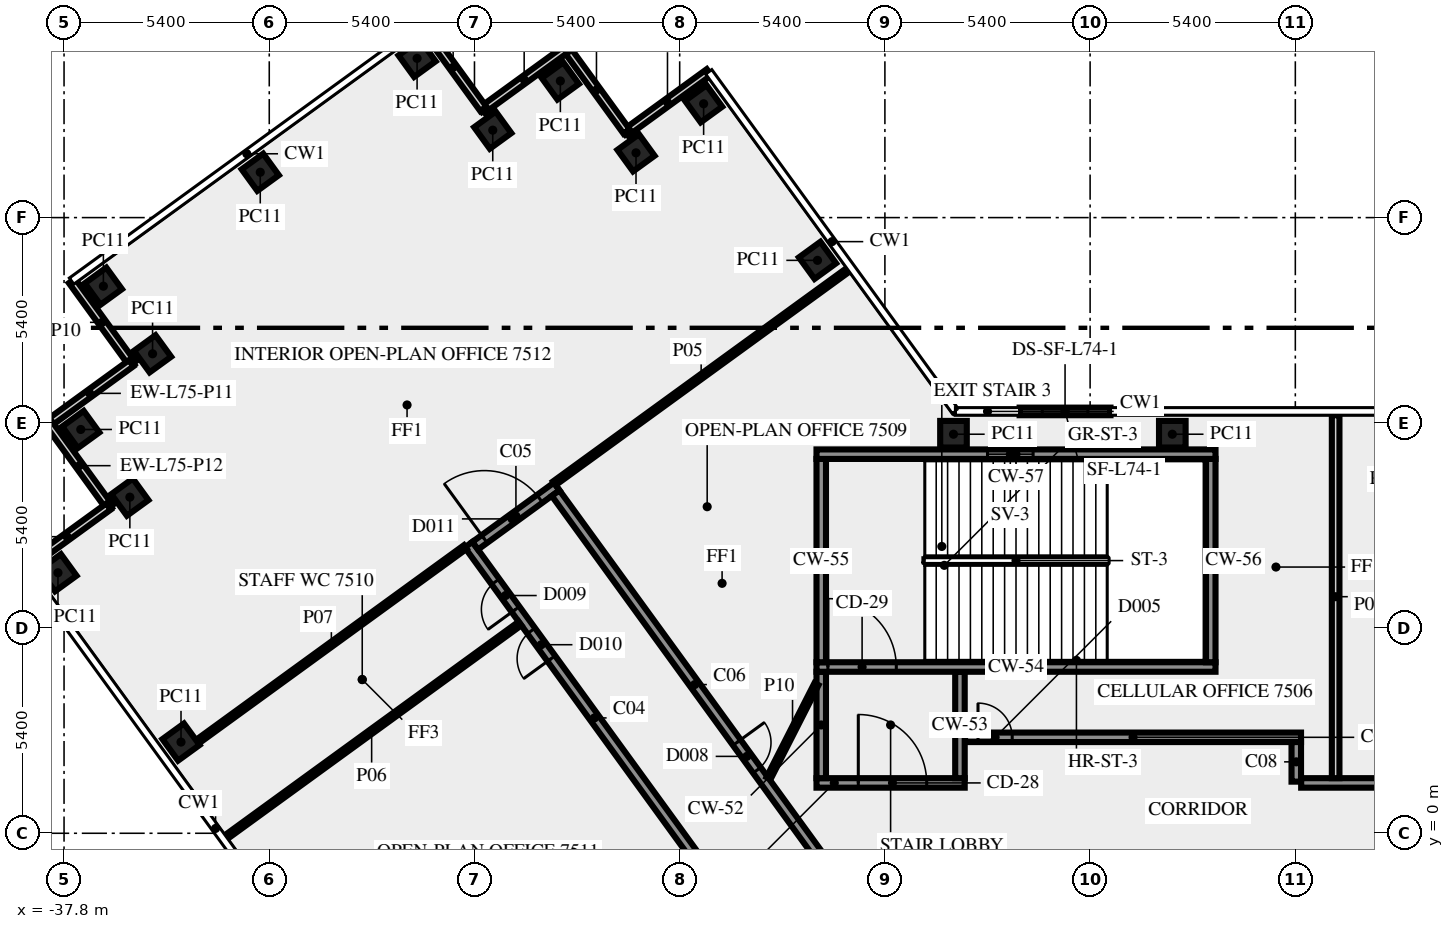
"""IFC4 building model, lengths in metres.
Left out: names, types, materials, properties, quantities, classifications, styles, units other than length and angle.
Written with IfcOpenShell. Run it as: python <this file> out.ifc"""

import sys

from ifc_helpers import new_model, si_unit, direction, frame, frame_2d, origin, origin_2d, place, context, subcontext, project, spatial, rectangle, extrude, element, fill, save


model = new_model("IFC4")
c1 = context("Model", 3, precision=1e-05, world=origin(), true_north=direction((0.0, 1.0)))
c2 = subcontext(c1, "Body", "Model", "MODEL_VIEW")
j1 = project(units=[si_unit("LENGTHUNIT", "METRE"), si_unit("PLANEANGLEUNIT", "RADIAN")], contexts=[c1])
p1 = place(None, origin())
s1 = spatial("IfcSite", under=j1, at=p1, CompositionType="ELEMENT")
p2 = place(p1, origin())
s2 = spatial("IfcBuilding", under=s1, at=p2, CompositionType="ELEMENT")
p3 = place(p2, frame((0.0, 0.0, 323.0)))
s3 = spatial("IfcBuildingStorey", under=s2, at=p3, CompositionType="ELEMENT", Elevation=323.0)
for number, where, z_axis, x_axis in (
    (1, (-17.974, 15.075, 0.0), (0.0, 0.0, 1.0), (-0.588, 0.809, 0.0)),
    (2, (-20.97, 19.195, 0.0), (0.0, 0.0, 1.0), (-0.588, 0.809, 0.0)),
    (3, (-22.749, 17.904, 0.0), (0.0, 0.0, 1.0), (-0.588, 0.809, 0.0)),
    (4, (-24.74, 19.795, 0.0), (0.0, 0.0, 1.0), (-0.588, 0.809, 0.0)),
    (5, (-26.519, 18.5, 0.0), (0.0, 0.0, 1.0), (-0.588, 0.809, 0.0)),
    (6, (-28.51, 20.39, 0.0), (0.0, 0.0, 1.0), (-0.809, -0.588, 0.0)),
    (7, (-32.637, 17.393, 0.0), (0.0, 0.0, 1.0), (-0.809, -0.588, 0.0)),
    (8, (-36.765, 14.395, 0.0), (0.0, 0.0, 1.0), (0.588, -0.809, 0.0)),
    (9, (-35.471, 12.616, 0.0), (0.0, 0.0, 1.0), (-0.809, -0.588, 0.0)),
    (10, (-37.36, 10.625, 0.0), (0.0, 0.0, 1.0), (0.588, -0.809, 0.0)),
    (11, (-36.068, 8.844, 0.0), (0.0, 0.0, 1.0), (0.588, -0.809, 0.0)),
    (12, (-37.96, 6.855, 0.0), (0.0, 0.0, 1.0), (0.588, -0.809, 0.0)),
    (13, (-34.722, 2.4, 0.0), (0.0, 0.0, 1.0), (0.588, -0.809, 0.0)),
    (14, (-8.637, 10.5, 0.0), (0.0, 0.0, 1.0), (-1.0, 0.0, 0.0)),
    (15, (-14.395, 10.5, 0.0), (0.0, 0.0, 1.0), (-1.0, 0.0, 0.0)),
):
    element("IfcColumn", number, at=place(p3, frame(where, z_axis=z_axis, x_axis=x_axis)), inside=s3, PredefinedType="COLUMN", context=c2, shape_type="SweptSolid", body=[
        extrude(rectangle(XDim=0.7, YDim=0.7, at=origin_2d()), origin(), (0.0, 0.0, 1.0), 3.65),
    ])
for number, where, z_axis, x_axis in (
    (16, (-20.829, 20.025, 0.0), (0.0, 0.0, 1.0), (-0.809, -0.588, 0.0)),
    (17, (-22.996, 18.466, 0.0), (0.0, 0.0, 1.0), (-0.588, 0.809, 0.0)),
):
    element("IfcWall", number, at=place(p3, frame(where, z_axis=z_axis, x_axis=x_axis)), inside=s3, PredefinedType="SOLIDWALL", context=c2, shape_type="SweptSolid", body=[
        extrude(rectangle(XDim=2.7, YDim=0.2, at=frame_2d((1.35, 0.0))), origin(), (0.0, 0.0, 1.0), 3.65),
    ])
for number, where, z_axis, x_axis in (
    (18, (-24.6, 20.623, 0.0), (0.0, 0.0, 1.0), (-0.809, -0.588, 0.0)),
    (19, (-26.768, 19.063, 0.0), (0.0, 0.0, 1.0), (-0.588, 0.809, 0.0)),
):
    element("IfcWall", number, at=place(p3, frame(where, z_axis=z_axis, x_axis=x_axis)), inside=s3, PredefinedType="SOLIDWALL", context=c2, shape_type="SweptSolid", body=[
        extrude(rectangle(XDim=2.7, YDim=0.2, at=frame_2d((1.35, 0.0))), origin(), (0.0, 0.0, 1.0), 3.65),
    ])
for number, where, z_axis, x_axis in (
    (20, (-37.592, 14.536, 0.0), (0.0, 0.0, 1.0), (0.588, -0.809, 0.0)),
    (21, (-36.032, 12.369, 0.0), (0.0, 0.0, 1.0), (-0.809, -0.588, 0.0)),
    (22, (-38.189, 10.765, 0.0), (0.0, 0.0, 1.0), (0.588, -0.809, 0.0)),
    (23, (-36.629, 8.597, 0.0), (0.0, 0.0, 1.0), (-0.809, -0.588, 0.0)),
):
    element("IfcWall", number, at=place(p3, frame(where, z_axis=z_axis, x_axis=x_axis)), inside=s3, PredefinedType="SOLIDWALL", context=c2, shape_type="SweptSolid", body=[
        extrude(rectangle(XDim=2.7, YDim=0.2, at=frame_2d((1.35, 0.0))), origin(), (0.0, 0.0, 1.0), 3.65),
    ])
p4 = place(p3, frame((-10.263, 11.1, 0.0), z_axis=(0.0, 0.0, 1.0), x_axis=(-1.0, 0.0, 0.0)))
e24 = element("IfcWall", 24, at=p4, inside=s3, PredefinedType="SOLIDWALL", context=c2, shape_type="SweptSolid", body=[
    extrude(rectangle(XDim=2.392, YDim=0.2, at=frame_2d((1.196, 0.0))), origin(), (0.0, 0.0, 1.0), 3.65),
])
p5 = place(p4, frame((0.596, 0.0, 1.0)))
e25 = element("IfcOpeningElement", 25, at=p5, cuts=e24, PredefinedType="OPENING", context=c2, shape_type="SweptSolid", body=[
    extrude(rectangle(XDim=1.2, YDim=1.2, at=frame_2d((0.6, 0.6))), frame((0.0, 0.11, 0.0), z_axis=(0.0, -1.0, 0.0), x_axis=(1.0, 0.0, 0.0)), (0.0, 0.0, 1.0), 0.22),
])
p6 = place(p3, frame((-18.0, 1.325, 0.0), z_axis=(0.0, 0.0, 1.0), x_axis=(1.0, 0.0, 0.0)))
e26 = element("IfcWall", 26, at=p6, inside=s3, PredefinedType="SHEAR", context=c2, shape_type="SweptSolid", body=[
    extrude(rectangle(XDim=3.9, YDim=0.25, at=frame_2d((1.95, 0.0))), origin(), (0.0, 0.0, 1.0), 3.65),
])
p7 = place(p6, frame((1.1, 0.0, 0.0)))
e27 = element("IfcOpeningElement", 27, at=p7, cuts=e26, PredefinedType="OPENING", context=c2, shape_type="SweptSolid", body=[
    extrude(rectangle(XDim=1.8, YDim=2.1, at=frame_2d((0.9, 1.05))), frame((0.0, 0.135, 0.0), z_axis=(0.0, -1.0, 0.0), x_axis=(1.0, 0.0, 0.0)), (0.0, 0.0, 1.0), 0.27),
])
for number, where, z_axis, x_axis in (
    (28, (-17.875, 1.45, 0.0), (0.0, 0.0, 1.0), (0.0, 1.0, 0.0)),
    (29, (-14.225, 1.45, 0.0), (0.0, 0.0, 1.0), (0.0, 1.0, 0.0)),
):
    element("IfcWall", number, at=place(p3, frame(where, z_axis=z_axis, x_axis=x_axis)), inside=s3, PredefinedType="SHEAR", context=c2, shape_type="SweptSolid", body=[
        extrude(rectangle(XDim=2.8, YDim=0.25, at=frame_2d((1.4, 0.0))), origin(), (0.0, 0.0, 1.0), 3.65),
    ])
p8 = place(p3, frame((-18.0, 4.375, 0.0), z_axis=(0.0, 0.0, 1.0), x_axis=(1.0, 0.0, 0.0)))
e30 = element("IfcWall", 30, at=p8, inside=s3, PredefinedType="SHEAR", context=c2, shape_type="SweptSolid", body=[
    extrude(rectangle(XDim=10.5, YDim=0.25, at=frame_2d((5.25, 0.0))), origin(), (0.0, 0.0, 1.0), 3.65),
])
p9 = place(p8, frame((0.3, 0.0, 0.0)))
e31 = element("IfcOpeningElement", 31, at=p9, cuts=e30, PredefinedType="OPENING", context=c2, shape_type="SweptSolid", body=[
    extrude(rectangle(XDim=1.8, YDim=2.1, at=frame_2d((0.9, 1.05))), frame((0.0, 0.135, 0.0), z_axis=(0.0, -1.0, 0.0), x_axis=(1.0, 0.0, 0.0)), (0.0, 0.0, 1.0), 0.27),
])
for number, where, z_axis, x_axis in (
    (32, (-17.875, 4.5, 0.0), (0.0, 0.0, 1.0), (0.0, 1.0, 0.0)),
    (33, (-7.625, 4.5, 0.0), (0.0, 0.0, 1.0), (0.0, 1.0, 0.0)),
):
    element("IfcWall", number, at=place(p3, frame(where, z_axis=z_axis, x_axis=x_axis)), inside=s3, PredefinedType="SHEAR", context=c2, shape_type="SweptSolid", body=[
        extrude(rectangle(XDim=5.35, YDim=0.25, at=frame_2d((2.675, 0.0))), origin(), (0.0, 0.0, 1.0), 3.65),
    ])
p10 = place(p3, frame((-18.0, 9.975, 0.0), z_axis=(0.0, 0.0, 1.0), x_axis=(1.0, 0.0, 0.0)))
e34 = element("IfcWall", 34, at=p10, inside=s3, PredefinedType="SHEAR", context=c2, shape_type="SweptSolid", body=[
    extrude(rectangle(XDim=10.5, YDim=0.25, at=frame_2d((5.25, 0.0))), origin(), (0.0, 0.0, 1.0), 3.65),
])
p11 = place(p10, frame((4.5, 0.0, 1.0)))
e35 = element("IfcOpeningElement", 35, at=p11, cuts=e34, PredefinedType="OPENING", context=c2, shape_type="SweptSolid", body=[
    extrude(rectangle(XDim=1.2, YDim=1.2, at=frame_2d((0.6, 0.6))), frame((0.0, 0.135, 0.0), z_axis=(0.0, -1.0, 0.0), x_axis=(1.0, 0.0, 0.0)), (0.0, 0.0, 1.0), 0.27),
])
p12 = place(p3, frame((-20.531, -1.523, 0.0), z_axis=(0.0, 0.0, 1.0), x_axis=(-0.587782646447, 0.809018887626, 0.0)))
e36 = element("IfcWall", 36, at=p12, inside=s3, PredefinedType="SOLIDWALL", context=c2, shape_type="SweptSolid", body=[
    extrude(rectangle(XDim=11.27, YDim=0.25, at=frame_2d((5.635, 0.0))), origin(), (0.0, 0.0, 1.0), 3.65),
])
p13 = place(p12, frame((7.566, 0.0, 0.0)))
e37 = element("IfcOpeningElement", 37, at=p13, cuts=e36, PredefinedType="OPENING", context=c2, shape_type="SweptSolid", body=[
    extrude(rectangle(XDim=0.9, YDim=2.1, at=frame_2d((0.45, 1.05))), frame((0.0, 0.135, 0.0), z_axis=(0.0, -1.0, 0.0), x_axis=(1.0, 0.0, 0.0)), (0.0, 0.0, 1.0), 0.27),
])
p14 = place(p12, frame((9.165, 0.0, 0.0)))
e38 = element("IfcOpeningElement", 38, at=p14, cuts=e36, PredefinedType="OPENING", context=c2, shape_type="SweptSolid", body=[
    extrude(rectangle(XDim=0.9, YDim=2.1, at=frame_2d((0.45, 1.05))), frame((0.0, 0.135, 0.0), z_axis=(0.0, -1.0, 0.0), x_axis=(1.0, 0.0, 0.0)), (0.0, 0.0, 1.0), 0.27),
])
p15 = place(p3, frame((-26.981, 7.567, 0.0), z_axis=(0.0, 0.0, 1.0), x_axis=(0.809038743598, 0.587755315891, 0.0)))
e39 = element("IfcWall", 39, at=p15, inside=s3, PredefinedType="SOLIDWALL", context=c2, shape_type="SweptSolid", body=[
    extrude(rectangle(XDim=2.65, YDim=0.25, at=frame_2d((1.325, 0.0))), origin(), (0.0, 0.0, 1.0), 3.65),
])
p16 = place(p15, frame((0.3, 0.0, 0.0)))
e40 = element("IfcOpeningElement", 40, at=p16, cuts=e39, PredefinedType="OPENING", context=c2, shape_type="SweptSolid", body=[
    extrude(rectangle(XDim=1.8, YDim=2.1, at=frame_2d((0.9, 1.05))), frame((0.0, 0.135, 0.0), z_axis=(0.0, -1.0, 0.0), x_axis=(1.0, 0.0, 0.0)), (0.0, 0.0, 1.0), 0.27),
])
p17 = place(p3, frame((-24.865, 8.95, 0.0), z_axis=(0.0, 0.0, 1.0), x_axis=(0.587791617212, -0.809012369952, 0.0)))
e41 = element("IfcWall", 41, at=p17, inside=s3, PredefinedType="SOLIDWALL", context=c2, shape_type="SweptSolid", body=[
    extrude(rectangle(XDim=12.453, YDim=0.25, at=frame_2d((6.227, 0.0))), origin(), (0.0, 0.0, 1.0), 3.65),
])
p18 = place(p17, frame((8.112, 0.0, 0.0)))
e42 = element("IfcOpeningElement", 42, at=p18, cuts=e41, PredefinedType="OPENING", context=c2, shape_type="SweptSolid", body=[
    extrude(rectangle(XDim=0.9, YDim=2.1, at=frame_2d((0.45, 1.05))), frame((0.0, 0.135, 0.0), z_axis=(0.0, -1.0, 0.0), x_axis=(1.0, 0.0, 0.0)), (0.0, 0.0, 1.0), 0.27),
])
p19 = place(p3, frame((-14.09, 2.525, 0.0), z_axis=(0.0, 0.0, 1.0), x_axis=(1.0, 0.0, 0.0)))
e43 = element("IfcWall", 43, at=p19, inside=s3, PredefinedType="SOLIDWALL", context=c2, shape_type="SweptSolid", body=[
    extrude(rectangle(XDim=8.84, YDim=0.25, at=frame_2d((4.42, 0.0))), origin(), (0.0, 0.0, 1.0), 3.65),
])
p20 = place(p19, frame((0.34, 0.0, 0.0)))
e44 = element("IfcOpeningElement", 44, at=p20, cuts=e43, PredefinedType="OPENING", context=c2, shape_type="SweptSolid", body=[
    extrude(rectangle(XDim=0.9, YDim=2.1, at=frame_2d((0.45, 1.05))), frame((0.0, 0.135, 0.0), z_axis=(0.0, -1.0, 0.0), x_axis=(1.0, 0.0, 0.0)), (0.0, 0.0, 1.0), 0.27),
])
p21 = place(p3, frame((-5.375, 2.4, 0.0), z_axis=(0.0, 0.0, 1.0), x_axis=(0.0, -1.0, 0.0)))
e45 = element("IfcWall", 45, at=p21, inside=s3, PredefinedType="SOLIDWALL", context=c2, shape_type="SweptSolid", body=[
    extrude(rectangle(XDim=1.041, YDim=0.25, at=frame_2d((0.521, 0.0))), origin(), (0.0, 0.0, 1.0), 3.65),
])
p22 = place(p3, frame((-5.246, 1.325, 0.0), z_axis=(0.0, 0.0, 1.0), x_axis=(1.0, 0.0, 0.0)))
e46 = element("IfcWall", 46, at=p22, inside=s3, PredefinedType="SOLIDWALL", context=c2, shape_type="SweptSolid", body=[
    extrude(rectangle(XDim=19.336, YDim=0.25, at=frame_2d((9.668, 0.0))), origin(), (0.0, 0.0, 1.0), 3.65),
])
p23 = place(p22, frame((10.894, 0.0, 0.0)))
e47 = element("IfcOpeningElement", 47, at=p23, cuts=e46, PredefinedType="OPENING", context=c2, shape_type="SweptSolid", body=[
    extrude(rectangle(XDim=1.2, YDim=2.1, at=frame_2d((0.6, 1.05))), frame((0.0, 0.135, 0.0), z_axis=(0.0, -1.0, 0.0), x_axis=(1.0, 0.0, 0.0)), (0.0, 0.0, 1.0), 0.27),
])
p24 = place(p22, frame((18.096, 0.0, 0.0)))
e48 = element("IfcOpeningElement", 48, at=p24, cuts=e46, PredefinedType="OPENING", context=c2, shape_type="SweptSolid", body=[
    extrude(rectangle(XDim=0.9, YDim=2.1, at=frame_2d((0.45, 1.05))), frame((0.0, 0.135, 0.0), z_axis=(0.0, -1.0, 0.0), x_axis=(1.0, 0.0, 0.0)), (0.0, 0.0, 1.0), 0.27),
])
p25 = place(p3, frame((-4.339, 1.45, 0.0), z_axis=(0.0, 0.0, 1.0), x_axis=(0.0, 1.0, 0.0)))
e49 = element("IfcWall", 49, at=p25, inside=s3, PredefinedType="SOLIDWALL", context=c2, shape_type="SweptSolid", body=[
    extrude(rectangle(XDim=9.55, YDim=0.2, at=frame_2d((4.775, 0.0))), origin(), (0.0, 0.0, 1.0), 2.95),
])
p26 = place(p3, frame((-17.172, 14.823, 0.0), z_axis=(0.0, 0.0, 1.0), x_axis=(-0.809013490065, -0.587790075531, 0.0)))
e50 = element("IfcWall", 50, at=p26, inside=s3, PredefinedType="PARTITIONING", context=c2, shape_type="SweptSolid", body=[
    extrude(rectangle(XDim=9.549, YDim=0.12, at=frame_2d((4.775, 0.0))), origin(), (0.0, 0.0, 1.0), 2.95),
])
p27 = place(p3, frame((-25.802, 5.519, 0.0), z_axis=(0.0, 0.0, 1.0), x_axis=(-0.808994179369, -0.587816653173, 0.0)))
e51 = element("IfcWall", 51, at=p27, inside=s3, PredefinedType="PARTITIONING", context=c2, shape_type="SweptSolid", body=[
    extrude(rectangle(XDim=9.651, YDim=0.12, at=frame_2d((4.825, 0.0))), origin(), (0.0, 0.0, 1.0), 2.95),
])
p28 = place(p3, frame((-34.291, 2.41, 0.0), z_axis=(0.0, 0.0, 1.0), x_axis=(0.809027940177, 0.587770186393, 0.0)))
e52 = element("IfcWall", 52, at=p28, inside=s3, PredefinedType="PARTITIONING", context=c2, shape_type="SweptSolid", body=[
    extrude(rectangle(XDim=8.715, YDim=0.12, at=frame_2d((4.357, 0.0))), origin(), (0.0, 0.0, 1.0), 3.65),
])
p29 = place(p3, frame((-19.261, 1.45, 0.0), z_axis=(0.0, 0.0, 1.0), x_axis=(0.453950796792, 0.891026752736, 0.0)))
e53 = element("IfcWall", 53, at=p29, inside=s3, PredefinedType="PARTITIONING", context=c2, shape_type="SweptSolid", body=[
    extrude(rectangle(XDim=2.778, YDim=0.12, at=frame_2d((1.389, 0.0))), origin(), (0.0, 0.0, 1.0), 3.65),
])
p30 = place(p5, origin())
e54 = element("IfcWindow", 54, at=p30, inside=s3, PartitioningType="SINGLE_PANEL", PredefinedType="WINDOW", context=c2, shape_type="SweptSolid", body=[
    extrude(rectangle(XDim=1.2, YDim=1.2, at=frame_2d((0.6, 0.6))), frame((0.0, 0.03, 0.0), z_axis=(0.0, -1.0, 0.0), x_axis=(1.0, 0.0, 0.0)), (0.0, 0.0, 1.0), 0.06),
])
fill(e25, e54)
p31 = place(p7, origin())
e55 = element("IfcDoor", 55, at=p31, inside=s3, OperationType="DOUBLE_DOOR_SINGLE_SWING", PredefinedType="DOOR", context=c2, shape_type="SweptSolid", body=[
    extrude(rectangle(XDim=1.8, YDim=2.1, at=frame_2d((0.9, 1.05))), frame((0.0, 0.025, 0.0), z_axis=(0.0, -1.0, 0.0), x_axis=(1.0, 0.0, 0.0)), (0.0, 0.0, 1.0), 0.05),
])
fill(e27, e55)
p32 = place(p9, origin())
e56 = element("IfcDoor", 56, at=p32, inside=s3, OperationType="DOUBLE_DOOR_SINGLE_SWING", PredefinedType="DOOR", context=c2, shape_type="SweptSolid", body=[
    extrude(rectangle(XDim=1.8, YDim=2.1, at=frame_2d((0.9, 1.05))), frame((0.0, 0.025, 0.0), z_axis=(0.0, -1.0, 0.0), x_axis=(1.0, 0.0, 0.0)), (0.0, 0.0, 1.0), 0.05),
])
fill(e31, e56)
p33 = place(p11, origin())
e57 = element("IfcWindow", 57, at=p33, inside=s3, PartitioningType="SINGLE_PANEL", PredefinedType="WINDOW", context=c2, shape_type="SweptSolid", body=[
    extrude(rectangle(XDim=1.2, YDim=1.2, at=frame_2d((0.6, 0.6))), frame((0.0, 0.03, 0.0), z_axis=(0.0, -1.0, 0.0), x_axis=(1.0, 0.0, 0.0)), (0.0, 0.0, 1.0), 0.06),
])
fill(e35, e57)
p34 = place(p20, origin())
e58 = element("IfcDoor", 58, at=p34, inside=s3, OperationType="SINGLE_SWING_LEFT", PredefinedType="DOOR", context=c2, shape_type="SweptSolid", body=[
    extrude(rectangle(XDim=0.9, YDim=2.1, at=frame_2d((0.45, 1.05))), frame((0.0, 0.025, 0.0), z_axis=(0.0, -1.0, 0.0), x_axis=(1.0, 0.0, 0.0)), (0.0, 0.0, 1.0), 0.05),
])
fill(e44, e58)
p35 = place(p18, origin())
e59 = element("IfcDoor", 59, at=p35, inside=s3, OperationType="SINGLE_SWING_RIGHT", PredefinedType="DOOR", context=c2, shape_type="SweptSolid", body=[
    extrude(rectangle(XDim=0.9, YDim=2.1, at=frame_2d((0.45, 1.05))), frame((0.0, 0.025, 0.0), z_axis=(0.0, -1.0, 0.0), x_axis=(1.0, 0.0, 0.0)), (0.0, 0.0, 1.0), 0.05),
])
fill(e42, e59)
p36 = place(p13, origin())
e60 = element("IfcDoor", 60, at=p36, inside=s3, OperationType="SINGLE_SWING_RIGHT", PredefinedType="DOOR", context=c2, shape_type="SweptSolid", body=[
    extrude(rectangle(XDim=0.9, YDim=2.1, at=frame_2d((0.45, 1.05))), frame((0.0, 0.025, 0.0), z_axis=(0.0, -1.0, 0.0), x_axis=(1.0, 0.0, 0.0)), (0.0, 0.0, 1.0), 0.05),
])
fill(e37, e60)
p37 = place(p16, origin())
e61 = element("IfcDoor", 61, at=p37, inside=s3, OperationType="DOUBLE_DOOR_SINGLE_SWING", PredefinedType="DOOR", context=c2, shape_type="SweptSolid", body=[
    extrude(rectangle(XDim=1.8, YDim=2.1, at=frame_2d((0.9, 1.05))), frame((0.0, 0.025, 0.0), z_axis=(0.0, -1.0, 0.0), x_axis=(1.0, 0.0, 0.0)), (0.0, 0.0, 1.0), 0.05),
])
fill(e40, e61)
p38 = place(p14, origin())
e62 = element("IfcDoor", 62, at=p38, inside=s3, OperationType="SINGLE_SWING_LEFT", PredefinedType="DOOR", context=c2, shape_type="SweptSolid", body=[
    extrude(rectangle(XDim=0.9, YDim=2.1, at=frame_2d((0.45, 1.05))), frame((0.0, 0.025, 0.0), z_axis=(0.0, -1.0, 0.0), x_axis=(1.0, 0.0, 0.0)), (0.0, 0.0, 1.0), 0.05),
])
fill(e38, e62)
save(model, sys.argv[1])
